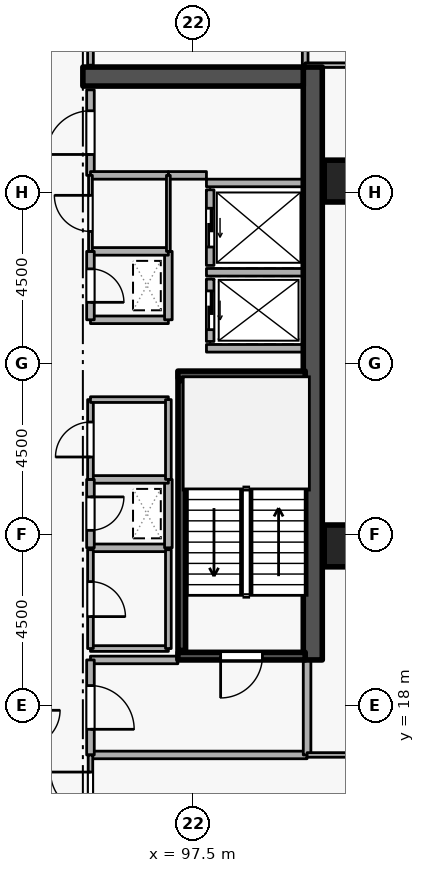
"""IFC4 building model, lengths in metres.
Left out: names, types, materials, properties, quantities, classifications, styles, units other than length and angle.
Written with IfcOpenShell. Run it as: python <this file> out.ifc"""

import sys

from ifc_helpers import new_model, si_unit, direction, frame, frame_2d, origin, origin_2d, place, context, subcontext, project, spatial, rectangle, extrude, element, fill, save


model = new_model("IFC4")
c1 = context("Model", 3, precision=1e-05, world=origin(), true_north=direction((0.0, 1.0)))
c2 = subcontext(c1, "Body", "Model", "MODEL_VIEW")
j1 = project(units=[si_unit("LENGTHUNIT", "METRE"), si_unit("PLANEANGLEUNIT", "RADIAN")], contexts=[c1])
p1 = place(None, origin())
s1 = spatial("IfcSite", under=j1, at=p1, CompositionType="ELEMENT")
p2 = place(p1, origin())
s2 = spatial("IfcBuilding", under=s1, at=p2, CompositionType="ELEMENT")
p3 = place(p2, frame((0.0, 0.0, 192.9)))
s3 = spatial("IfcBuildingStorey", under=s2, at=p3, CompositionType="ELEMENT", Elevation=192.9)
p4 = place(p3, frame((100.65, 19.2, 0.0), z_axis=(0.0, 0.0, 1.0), x_axis=(0.0, 1.0, 0.0)))
e1 = element("IfcWall", 1, at=p4, inside=s3, PredefinedType="SHEAR", context=c2, shape_type="SweptSolid", body=[
    extrude(rectangle(XDim=15.6, YDim=0.5, at=frame_2d((7.8, 0.0))), origin(), (0.0, 0.0, 1.0), 3.6),
])
p5 = place(p3, frame((94.6, 34.55, 0.0), z_axis=(0.0, 0.0, 1.0), x_axis=(1.0, 0.0, 0.0)))
e2 = element("IfcWall", 2, at=p5, inside=s3, PredefinedType="SHEAR", context=c2, shape_type="SweptSolid", body=[
    extrude(rectangle(XDim=5.8, YDim=0.5, at=frame_2d((2.9, 0.0))), origin(), (0.0, 0.0, 1.0), 3.6),
])
for number, where, z_axis, x_axis in (
    (3, (101.5, 22.2, 0.0), (0.0, 0.0, 1.0), (1.0, 0.0, 0.0)),
    (4, (101.5, 31.8, 0.0), (0.0, 0.0, 1.0), (1.0, 0.0, 0.0)),
):
    element("IfcColumn", number, at=place(p3, frame(where, z_axis=z_axis, x_axis=x_axis)), inside=s3, PredefinedType="COLUMN", context=c2, shape_type="SweptSolid", body=[
        extrude(rectangle(XDim=1.1, YDim=1.1, at=origin_2d()), origin(), (0.0, 0.0, 1.0), 3.6),
    ])
p6 = place(p3, frame((97.95, 29.22, 0.0), z_axis=(0.0, 0.0, 1.0), x_axis=(0.0, -1.0, 0.0)))
e5 = element("IfcWall", 5, at=p6, inside=s3, PredefinedType="STANDARD", context=c2, shape_type="SweptSolid", body=[
    extrude(rectangle(XDim=1.64, YDim=0.2, at=frame_2d((0.82, 0.0))), origin(), (0.0, 0.0, 1.0), 3.34),
])
p7 = place(p6, frame((0.31, 0.0, 0.0)))
e6 = element("IfcOpeningElement", 6, at=p7, cuts=e5, PredefinedType="OPENING", context=c2, shape_type="SweptSolid", body=[
    extrude(rectangle(XDim=1.02, YDim=2.06, at=frame_2d((0.51, 1.03))), frame((0.0, 0.11, 0.0), z_axis=(0.0, -1.0, 0.0), x_axis=(1.0, 0.0, 0.0)), (0.0, 0.0, 1.0), 0.22),
])
p8 = place(p3, frame((97.95, 31.57, 0.0), z_axis=(0.0, 0.0, 1.0), x_axis=(0.0, -1.0, 0.0)))
e7 = element("IfcWall", 7, at=p8, inside=s3, PredefinedType="STANDARD", context=c2, shape_type="SweptSolid", body=[
    extrude(rectangle(XDim=1.99, YDim=0.2, at=frame_2d((0.995, 0.0))), origin(), (0.0, 0.0, 1.0), 3.34),
])
p9 = place(p8, frame((0.485, 0.0, 0.0)))
e8 = element("IfcOpeningElement", 8, at=p9, cuts=e7, PredefinedType="OPENING", context=c2, shape_type="SweptSolid", body=[
    extrude(rectangle(XDim=1.02, YDim=2.06, at=frame_2d((0.51, 1.03))), frame((0.0, 0.11, 0.0), z_axis=(0.0, -1.0, 0.0), x_axis=(1.0, 0.0, 0.0)), (0.0, 0.0, 1.0), 0.22),
])
for number, where, z_axis, x_axis in (
    (9, (97.852, 29.4, 0.0), (0.0, 0.0, 1.0), (1.0, 0.0, 0.0)),
    (10, (97.852, 27.4, 0.0), (0.0, 0.0, 1.0), (1.0, 0.0, 0.0)),
    (11, (97.852, 31.75, 0.0), (0.0, 0.0, 1.0), (1.0, 0.0, 0.0)),
):
    element("IfcWall", number, at=place(p3, frame(where, z_axis=z_axis, x_axis=x_axis)), inside=s3, PredefinedType="STANDARD", context=c2, shape_type="SweptSolid", body=[
        extrude(rectangle(XDim=2.536, YDim=0.2, at=frame_2d((1.268, 0.0))), origin(), (0.0, 0.0, 1.0), 3.34),
    ])
p10 = place(p3, frame((100.45, 19.3, 0.0), z_axis=(0.0, 0.0, 1.0), x_axis=(-1.0, 0.0, 0.0)))
e12 = element("IfcWall", 12, at=p10, inside=s3, PredefinedType="SHEAR", context=c2, shape_type="SweptSolid", body=[
    extrude(rectangle(XDim=3.35, YDim=0.2, at=frame_2d((1.675, 0.0))), origin(), (0.0, 0.0, 1.0), 3.6),
])
p11 = place(p10, frame((1.125, 0.0, 0.0)))
e13 = element("IfcOpeningElement", 13, at=p11, cuts=e12, PredefinedType="OPENING", context=c2, shape_type="SweptSolid", body=[
    extrude(rectangle(XDim=1.1, YDim=2.1, at=frame_2d((0.55, 1.05))), frame((0.0, 0.11, 0.0), z_axis=(0.0, -1.0, 0.0), x_axis=(1.0, 0.0, 0.0)), (0.0, 0.0, 1.0), 0.22),
])
p12 = place(p3, frame((97.1, 26.7, 0.0), z_axis=(0.0, 0.0, 1.0), x_axis=(1.0, 0.0, 0.0)))
e14 = element("IfcWall", 14, at=p12, inside=s3, PredefinedType="SHEAR", context=c2, shape_type="SweptSolid", body=[
    extrude(rectangle(XDim=3.35, YDim=0.2, at=frame_2d((1.675, 0.0))), origin(), (0.0, 0.0, 1.0), 3.6),
])
p13 = place(p3, frame((97.203, 26.55, 0.0), z_axis=(0.0, 0.0, 1.0), x_axis=(0.0, -1.0, 0.0)))
e15 = element("IfcWall", 15, at=p13, inside=s3, PredefinedType="SHEAR", context=c2, shape_type="SweptSolid", body=[
    extrude(rectangle(XDim=7.1, YDim=0.2, at=frame_2d((3.55, 0.0))), origin(), (0.0, 0.0, 1.0), 3.6),
])
p14 = place(p3, frame((94.8, 16.7, 0.0), z_axis=(0.0, 0.0, 1.0), x_axis=(1.0, 0.0, 0.0)))
e16 = element("IfcWall", 16, at=p14, inside=s3, PredefinedType="STANDARD", context=c2, shape_type="SweptSolid", body=[
    extrude(rectangle(XDim=5.7, YDim=0.2, at=frame_2d((2.85, 0.0))), origin(), (0.0, 0.0, 1.0), 3.34),
])
p15 = place(p3, frame((100.5, 16.7, 0.0), z_axis=(0.0, 0.0, 1.0), x_axis=(0.0, 1.0, 0.0)))
e17 = element("IfcWall", 17, at=p15, inside=s3, PredefinedType="STANDARD", context=c2, shape_type="SweptSolid", body=[
    extrude(rectangle(XDim=2.5, YDim=0.2, at=frame_2d((1.25, 0.0))), origin(), (0.0, 0.0, 1.0), 3.34),
])
p16 = place(p3, frame((97.1, 19.2, 0.0), z_axis=(0.0, 0.0, 1.0), x_axis=(-1.0, 0.0, 0.0)))
e18 = element("IfcWall", 18, at=p16, inside=s3, PredefinedType="STANDARD", context=c2, shape_type="SweptSolid", body=[
    extrude(rectangle(XDim=2.3, YDim=0.2, at=frame_2d((1.15, 0.0))), origin(), (0.0, 0.0, 1.0), 2.545),
])
p17 = place(p3, frame((94.8, 19.2, 0.0), z_axis=(0.0, 0.0, 1.0), x_axis=(0.0, -1.0, 0.0)))
e19 = element("IfcWall", 19, at=p17, inside=s3, PredefinedType="STANDARD", context=c2, shape_type="SweptSolid", body=[
    extrude(rectangle(XDim=2.5, YDim=0.2, at=frame_2d((1.25, 0.0))), origin(), (0.0, 0.0, 1.0), 3.34),
])
p18 = place(p17, frame((0.675, 0.0, 0.0)))
e20 = element("IfcOpeningElement", 20, at=p18, cuts=e19, PredefinedType="OPENING", context=c2, shape_type="SweptSolid", body=[
    extrude(rectangle(XDim=1.15, YDim=2.1, at=frame_2d((0.575, 1.05))), frame((0.0, 0.11, 0.0), z_axis=(0.0, -1.0, 0.0), x_axis=(1.0, 0.0, 0.0)), (0.0, 0.0, 1.0), 0.22),
])
p19 = place(p3, frame((94.8, 28.15, 0.0), z_axis=(0.0, 0.0, 1.0), x_axis=(1.0, 0.0, 0.0)))
e21 = element("IfcWall", 21, at=p19, inside=s3, PredefinedType="STANDARD", context=c2, shape_type="SweptSolid", body=[
    extrude(rectangle(XDim=2.05, YDim=0.2, at=frame_2d((1.025, 0.0))), origin(), (0.0, 0.0, 1.0), 3.34),
])
p20 = place(p3, frame((96.85, 28.15, 0.0), z_axis=(0.0, 0.0, 1.0), x_axis=(0.0, 1.0, 0.0)))
e22 = element("IfcWall", 22, at=p20, inside=s3, PredefinedType="STANDARD", context=c2, shape_type="SweptSolid", body=[
    extrude(rectangle(XDim=1.8, YDim=0.2, at=frame_2d((0.9, 0.0))), origin(), (0.0, 0.0, 1.0), 3.34),
])
p21 = place(p3, frame((96.85, 29.95, 0.0), z_axis=(0.0, 0.0, 1.0), x_axis=(-1.0, 0.0, 0.0)))
e23 = element("IfcWall", 23, at=p21, inside=s3, PredefinedType="STANDARD", context=c2, shape_type="SweptSolid", body=[
    extrude(rectangle(XDim=2.05, YDim=0.2, at=frame_2d((1.025, 0.0))), origin(), (0.0, 0.0, 1.0), 3.34),
])
p22 = place(p3, frame((94.8, 29.95, 0.0), z_axis=(0.0, 0.0, 1.0), x_axis=(0.0, -1.0, 0.0)))
e24 = element("IfcWall", 24, at=p22, inside=s3, PredefinedType="STANDARD", context=c2, shape_type="SweptSolid", body=[
    extrude(rectangle(XDim=1.8, YDim=0.2, at=frame_2d((0.9, 0.0))), origin(), (0.0, 0.0, 1.0), 3.34),
])
p23 = place(p22, frame((0.46, 0.0, 0.0)))
e25 = element("IfcOpeningElement", 25, at=p23, cuts=e24, PredefinedType="OPENING", context=c2, shape_type="SweptSolid", body=[
    extrude(rectangle(XDim=0.88, YDim=2.04, at=frame_2d((0.44, 1.02))), frame((0.0, 0.11, 0.0), z_axis=(0.0, -1.0, 0.0), x_axis=(1.0, 0.0, 0.0)), (0.0, 0.0, 1.0), 0.22),
])
p24 = place(p3, frame((94.8, 22.15, 0.0), z_axis=(0.0, 0.0, 1.0), x_axis=(1.0, 0.0, 0.0)))
e26 = element("IfcWall", 26, at=p24, inside=s3, PredefinedType="STANDARD", context=c2, shape_type="SweptSolid", body=[
    extrude(rectangle(XDim=2.05, YDim=0.2, at=frame_2d((1.025, 0.0))), origin(), (0.0, 0.0, 1.0), 3.34),
])
p25 = place(p3, frame((96.85, 22.15, 0.0), z_axis=(0.0, 0.0, 1.0), x_axis=(0.0, 1.0, 0.0)))
e27 = element("IfcWall", 27, at=p25, inside=s3, PredefinedType="STANDARD", context=c2, shape_type="SweptSolid", body=[
    extrude(rectangle(XDim=1.8, YDim=0.2, at=frame_2d((0.9, 0.0))), origin(), (0.0, 0.0, 1.0), 3.34),
])
p26 = place(p3, frame((96.85, 23.95, 0.0), z_axis=(0.0, 0.0, 1.0), x_axis=(-1.0, 0.0, 0.0)))
e28 = element("IfcWall", 28, at=p26, inside=s3, PredefinedType="STANDARD", context=c2, shape_type="SweptSolid", body=[
    extrude(rectangle(XDim=2.05, YDim=0.2, at=frame_2d((1.025, 0.0))), origin(), (0.0, 0.0, 1.0), 3.34),
])
p27 = place(p3, frame((94.8, 23.95, 0.0), z_axis=(0.0, 0.0, 1.0), x_axis=(0.0, -1.0, 0.0)))
e29 = element("IfcWall", 29, at=p27, inside=s3, PredefinedType="STANDARD", context=c2, shape_type="SweptSolid", body=[
    extrude(rectangle(XDim=1.8, YDim=0.2, at=frame_2d((0.9, 0.0))), origin(), (0.0, 0.0, 1.0), 3.34),
])
p28 = place(p27, frame((0.46, 0.0, 0.0)))
e30 = element("IfcOpeningElement", 30, at=p28, cuts=e29, PredefinedType="OPENING", context=c2, shape_type="SweptSolid", body=[
    extrude(rectangle(XDim=0.88, YDim=2.04, at=frame_2d((0.44, 1.02))), frame((0.0, 0.11, 0.0), z_axis=(0.0, -1.0, 0.0), x_axis=(1.0, 0.0, 0.0)), (0.0, 0.0, 1.0), 0.22),
])
p29 = place(p3, frame((94.8, 31.95, 0.0), z_axis=(0.0, 0.0, 1.0), x_axis=(0.0, 1.0, 0.0)))
e31 = element("IfcWall", 31, at=p29, inside=s3, PredefinedType="STANDARD", context=c2, shape_type="SweptSolid", body=[
    extrude(rectangle(XDim=2.25, YDim=0.2, at=frame_2d((1.125, 0.0))), origin(), (0.0, 0.0, 1.0), 3.34),
])
p30 = place(p29, frame((0.55, 0.0, 0.0)))
e32 = element("IfcOpeningElement", 32, at=p30, cuts=e31, PredefinedType="OPENING", context=c2, shape_type="SweptSolid", body=[
    extrude(rectangle(XDim=1.15, YDim=2.1, at=frame_2d((0.575, 1.05))), frame((0.0, 0.11, 0.0), z_axis=(0.0, -1.0, 0.0), x_axis=(1.0, 0.0, 0.0)), (0.0, 0.0, 1.0), 0.22),
])
p31 = place(p3, frame((97.852, 31.95, 0.0), z_axis=(0.0, 0.0, 1.0), x_axis=(-1.0, 0.0, 0.0)))
e33 = element("IfcWall", 33, at=p31, inside=s3, PredefinedType="STANDARD", context=c2, shape_type="SweptSolid", body=[
    extrude(rectangle(XDim=1.002, YDim=0.2, at=frame_2d((0.501, 0.0))), origin(), (0.0, 0.0, 1.0), 3.34),
])
p32 = place(p3, frame((96.85, 31.95, 0.0), z_axis=(0.0, 0.0, 1.0), x_axis=(-1.0, 0.0, 0.0)))
e34 = element("IfcWall", 34, at=p32, inside=s3, PredefinedType="STANDARD", context=c2, shape_type="SweptSolid", body=[
    extrude(rectangle(XDim=2.05, YDim=0.2, at=frame_2d((1.025, 0.0))), origin(), (0.0, 0.0, 1.0), 3.34),
])
p33 = place(p3, frame((94.8, 19.5, 0.0), z_axis=(0.0, 0.0, 1.0), x_axis=(1.0, 0.0, 0.0)))
e35 = element("IfcWall", 35, at=p33, inside=s3, PredefinedType="PARTITIONING", context=c2, shape_type="SweptSolid", body=[
    extrude(rectangle(XDim=2.05, YDim=0.15, at=frame_2d((1.025, 0.0))), origin(), (0.0, 0.0, 1.0), 2.545),
])
p34 = place(p3, frame((96.85, 19.5, 0.0), z_axis=(0.0, 0.0, 1.0), x_axis=(0.0, 1.0, 0.0)))
e36 = element("IfcWall", 36, at=p34, inside=s3, PredefinedType="PARTITIONING", context=c2, shape_type="SweptSolid", body=[
    extrude(rectangle(XDim=2.6, YDim=0.15, at=frame_2d((1.3, 0.0))), origin(), (0.0, 0.0, 1.0), 3.34),
])
p35 = place(p3, frame((94.8, 22.1, 0.0), z_axis=(0.0, 0.0, 1.0), x_axis=(0.0, -1.0, 0.0)))
e37 = element("IfcWall", 37, at=p35, inside=s3, PredefinedType="PARTITIONING", context=c2, shape_type="SweptSolid", body=[
    extrude(rectangle(XDim=2.6, YDim=0.15, at=frame_2d((1.3, 0.0))), origin(), (0.0, 0.0, 1.0), 3.34),
])
p36 = place(p35, frame((0.84, 0.0, 0.0)))
e38 = element("IfcOpeningElement", 38, at=p36, cuts=e37, PredefinedType="OPENING", context=c2, shape_type="SweptSolid", body=[
    extrude(rectangle(XDim=0.92, YDim=2.08, at=frame_2d((0.46, 1.04))), frame((0.0, 0.085, 0.0), z_axis=(0.0, -1.0, 0.0), x_axis=(1.0, 0.0, 0.0)), (0.0, 0.0, 1.0), 0.17),
])
p37 = place(p3, frame((94.8, 23.95, 0.0), z_axis=(0.0, 0.0, 1.0), x_axis=(0.0, 1.0, 0.0)))
e39 = element("IfcWall", 39, at=p37, inside=s3, PredefinedType="PARTITIONING", context=c2, shape_type="SweptSolid", body=[
    extrude(rectangle(XDim=2.1, YDim=0.15, at=frame_2d((1.05, 0.0))), origin(), (0.0, 0.0, 1.0), 3.34),
])
p38 = place(p37, frame((0.59, 0.0, 0.0)))
e40 = element("IfcOpeningElement", 40, at=p38, cuts=e39, PredefinedType="OPENING", context=c2, shape_type="SweptSolid", body=[
    extrude(rectangle(XDim=0.92, YDim=2.08, at=frame_2d((0.46, 1.04))), frame((0.0, 0.085, 0.0), z_axis=(0.0, -1.0, 0.0), x_axis=(1.0, 0.0, 0.0)), (0.0, 0.0, 1.0), 0.17),
])
p39 = place(p3, frame((94.8, 26.05, 0.0), z_axis=(0.0, 0.0, 1.0), x_axis=(1.0, 0.0, 0.0)))
e41 = element("IfcWall", 41, at=p39, inside=s3, PredefinedType="PARTITIONING", context=c2, shape_type="SweptSolid", body=[
    extrude(rectangle(XDim=2.05, YDim=0.15, at=frame_2d((1.025, 0.0))), origin(), (0.0, 0.0, 1.0), 3.34),
])
p40 = place(p3, frame((96.85, 26.05, 0.0), z_axis=(0.0, 0.0, 1.0), x_axis=(0.0, -1.0, 0.0)))
e42 = element("IfcWall", 42, at=p40, inside=s3, PredefinedType="PARTITIONING", context=c2, shape_type="SweptSolid", body=[
    extrude(rectangle(XDim=2.1, YDim=0.15, at=frame_2d((1.05, 0.0))), origin(), (0.0, 0.0, 1.0), 3.34),
])
p41 = place(p3, frame((94.8, 29.95, 0.0), z_axis=(0.0, 0.0, 1.0), x_axis=(0.0, 1.0, 0.0)))
e43 = element("IfcWall", 43, at=p41, inside=s3, PredefinedType="PARTITIONING", context=c2, shape_type="SweptSolid", body=[
    extrude(rectangle(XDim=2.0, YDim=0.1, at=frame_2d((1.0, 0.0))), origin(), (0.0, 0.0, 1.0), 3.34),
])
p42 = place(p41, frame((0.525, 0.0, 0.0)))
e44 = element("IfcOpeningElement", 44, at=p42, cuts=e43, PredefinedType="OPENING", context=c2, shape_type="SweptSolid", body=[
    extrude(rectangle(XDim=0.95, YDim=2.1, at=frame_2d((0.475, 1.05))), frame((0.0, 0.06, 0.0), z_axis=(0.0, -1.0, 0.0), x_axis=(1.0, 0.0, 0.0)), (0.0, 0.0, 1.0), 0.12),
])
p43 = place(p3, frame((96.85, 31.95, 0.0), z_axis=(0.0, 0.0, 1.0), x_axis=(0.0, -1.0, 0.0)))
e45 = element("IfcWall", 45, at=p43, inside=s3, PredefinedType="PARTITIONING", context=c2, shape_type="SweptSolid", body=[
    extrude(rectangle(XDim=2.0, YDim=0.1, at=frame_2d((1.0, 0.0))), origin(), (0.0, 0.0, 1.0), 3.34),
])
p44 = place(p3, frame((100.45, 37.25, 0.0), z_axis=(0.0, 0.0, 1.0), x_axis=(0.0, -1.0, 0.0)))
e46 = element("IfcWall", 46, at=p44, inside=s3, PredefinedType="PARTITIONING", context=c2, shape_type="SweptSolid", body=[
    extrude(rectangle(XDim=2.4, YDim=0.15, at=frame_2d((1.2, 0.0))), origin(), (0.0, 0.0, 1.0), 3.34),
])
p45 = place(p3, frame((94.8, 34.85, 0.0), z_axis=(0.0, 0.0, 1.0), x_axis=(0.0, 1.0, 0.0)))
e47 = element("IfcWall", 47, at=p45, inside=s3, PredefinedType="PARTITIONING", context=c2, shape_type="SweptSolid", body=[
    extrude(rectangle(XDim=2.4, YDim=0.15, at=frame_2d((1.2, 0.0))), origin(), (0.0, 0.0, 1.0), 3.34),
])
p46 = place(p45, frame((0.725, 0.0, 0.0)))
e48 = element("IfcOpeningElement", 48, at=p46, cuts=e47, PredefinedType="OPENING", context=c2, shape_type="SweptSolid", body=[
    extrude(rectangle(XDim=0.95, YDim=2.1, at=frame_2d((0.475, 1.05))), frame((0.0, 0.085, 0.0), z_axis=(0.0, -1.0, 0.0), x_axis=(1.0, 0.0, 0.0)), (0.0, 0.0, 1.0), 0.17),
])
p47 = place(p3, frame((94.8, 14.75, 0.0), z_axis=(0.0, 0.0, 1.0), x_axis=(0.0, 1.0, 0.0)))
e49 = element("IfcWall", 49, at=p47, inside=s3, PredefinedType="PARTITIONING", context=c2, shape_type="SweptSolid", body=[
    extrude(rectangle(XDim=1.95, YDim=0.12, at=frame_2d((0.975, 0.0))), origin(), (0.0, 0.0, 1.0), 3.34),
])
p48 = place(p47, frame((0.45, 0.0, 0.0)))
e50 = element("IfcOpeningElement", 50, at=p48, cuts=e49, PredefinedType="OPENING", context=c2, shape_type="SweptSolid", body=[
    extrude(rectangle(XDim=1.05, YDim=2.1, at=frame_2d((0.525, 1.05))), frame((0.0, 0.07, 0.0), z_axis=(0.0, -1.0, 0.0), x_axis=(1.0, 0.0, 0.0)), (0.0, 0.0, 1.0), 0.14),
])
p49 = place(p3, frame((100.5, 16.7, 0.0), z_axis=(0.0, 0.0, 1.0), x_axis=(1.0, 0.0, 0.0)))
e51 = element("IfcWall", 51, at=p49, inside=s3, PredefinedType="PARTITIONING", context=c2, shape_type="SweptSolid", body=[
    extrude(rectangle(XDim=5.72, YDim=0.12, at=frame_2d((2.86, 0.0))), origin(), (0.0, 0.0, 1.0), 3.34),
])
p50 = place(p3, frame((106.22, 34.85, 0.0), z_axis=(0.0, 0.0, 1.0), x_axis=(-1.0, 0.0, 0.0)))
e52 = element("IfcWall", 52, at=p50, inside=s3, PredefinedType="PARTITIONING", context=c2, shape_type="SweptSolid", body=[
    extrude(rectangle(XDim=5.77, YDim=0.12, at=frame_2d((2.885, 0.0))), origin(), (0.0, 0.0, 1.0), 2.545),
])
p51 = place(p7, origin())
e53 = element("IfcDoor", 53, at=p51, inside=s3, OperationType="SLIDING_TO_LEFT", PredefinedType="DOOR", context=c2, shape_type="SweptSolid", body=[
    extrude(rectangle(XDim=1.02, YDim=2.06, at=frame_2d((0.51, 1.03))), frame((0.0, 0.025, 0.0), z_axis=(0.0, -1.0, 0.0), x_axis=(1.0, 0.0, 0.0)), (0.0, 0.0, 1.0), 0.05),
])
fill(e6, e53)
p52 = place(p9, origin())
e54 = element("IfcDoor", 54, at=p52, inside=s3, OperationType="SLIDING_TO_LEFT", PredefinedType="DOOR", context=c2, shape_type="SweptSolid", body=[
    extrude(rectangle(XDim=1.02, YDim=2.06, at=frame_2d((0.51, 1.03))), frame((0.0, 0.025, 0.0), z_axis=(0.0, -1.0, 0.0), x_axis=(1.0, 0.0, 0.0)), (0.0, 0.0, 1.0), 0.05),
])
fill(e8, e54)
p53 = place(p11, origin())
e55 = element("IfcDoor", 55, at=p53, inside=s3, OperationType="SINGLE_SWING_RIGHT", PredefinedType="DOOR", context=c2, shape_type="SweptSolid", body=[
    extrude(rectangle(XDim=1.1, YDim=2.1, at=frame_2d((0.55, 1.05))), frame((0.0, 0.025, 0.0), z_axis=(0.0, -1.0, 0.0), x_axis=(1.0, 0.0, 0.0)), (0.0, 0.0, 1.0), 0.05),
])
fill(e13, e55)
p54 = place(p18, origin())
e56 = element("IfcDoor", 56, at=p54, inside=s3, OperationType="SINGLE_SWING_RIGHT", PredefinedType="DOOR", context=c2, shape_type="SweptSolid", body=[
    extrude(rectangle(XDim=1.15, YDim=2.1, at=frame_2d((0.575, 1.05))), frame((0.0, 0.025, 0.0), z_axis=(0.0, -1.0, 0.0), x_axis=(1.0, 0.0, 0.0)), (0.0, 0.0, 1.0), 0.05),
])
fill(e20, e56)
p55 = place(p23, origin())
e57 = element("IfcDoor", 57, at=p55, inside=s3, OperationType="SINGLE_SWING_RIGHT", PredefinedType="DOOR", context=c2, shape_type="SweptSolid", body=[
    extrude(rectangle(XDim=0.88, YDim=2.04, at=frame_2d((0.44, 1.02))), frame((0.0, 0.025, 0.0), z_axis=(0.0, -1.0, 0.0), x_axis=(1.0, 0.0, 0.0)), (0.0, 0.0, 1.0), 0.05),
])
fill(e25, e57)
p56 = place(p28, origin())
e58 = element("IfcDoor", 58, at=p56, inside=s3, OperationType="SINGLE_SWING_LEFT", PredefinedType="DOOR", context=c2, shape_type="SweptSolid", body=[
    extrude(rectangle(XDim=0.88, YDim=2.04, at=frame_2d((0.44, 1.02))), frame((0.0, 0.025, 0.0), z_axis=(0.0, -1.0, 0.0), x_axis=(1.0, 0.0, 0.0)), (0.0, 0.0, 1.0), 0.05),
])
fill(e30, e58)
p57 = place(p36, origin())
e59 = element("IfcDoor", 59, at=p57, inside=s3, OperationType="SINGLE_SWING_RIGHT", PredefinedType="DOOR", context=c2, shape_type="SweptSolid", body=[
    extrude(rectangle(XDim=0.92, YDim=2.08, at=frame_2d((0.46, 1.04))), frame((0.0, 0.025, 0.0), z_axis=(0.0, -1.0, 0.0), x_axis=(1.0, 0.0, 0.0)), (0.0, 0.0, 1.0), 0.05),
])
fill(e38, e59)
p58 = place(p38, origin())
e60 = element("IfcDoor", 60, at=p58, inside=s3, OperationType="SINGLE_SWING_LEFT", PredefinedType="DOOR", context=c2, shape_type="SweptSolid", body=[
    extrude(rectangle(XDim=0.92, YDim=2.08, at=frame_2d((0.46, 1.04))), frame((0.0, 0.025, 0.0), z_axis=(0.0, -1.0, 0.0), x_axis=(1.0, 0.0, 0.0)), (0.0, 0.0, 1.0), 0.05),
])
fill(e40, e60)
p59 = place(p42, origin())
e61 = element("IfcDoor", 61, at=p59, inside=s3, OperationType="SINGLE_SWING_RIGHT", PredefinedType="DOOR", context=c2, shape_type="SweptSolid", body=[
    extrude(rectangle(XDim=0.95, YDim=2.1, at=frame_2d((0.475, 1.05))), frame((0.0, 0.025, 0.0), z_axis=(0.0, -1.0, 0.0), x_axis=(1.0, 0.0, 0.0)), (0.0, 0.0, 1.0), 0.05),
])
fill(e44, e61)
p60 = place(p30, origin())
e62 = element("IfcDoor", 62, at=p60, inside=s3, OperationType="SINGLE_SWING_LEFT", PredefinedType="DOOR", context=c2, shape_type="SweptSolid", body=[
    extrude(rectangle(XDim=1.15, YDim=2.1, at=frame_2d((0.575, 1.05))), frame((0.0, 0.025, 0.0), z_axis=(0.0, -1.0, 0.0), x_axis=(1.0, 0.0, 0.0)), (0.0, 0.0, 1.0), 0.05),
])
fill(e32, e62)
p61 = place(p48, origin())
e63 = element("IfcDoor", 63, at=p61, inside=s3, OperationType="SINGLE_SWING_RIGHT", PredefinedType="DOOR", context=c2, shape_type="SweptSolid", body=[
    extrude(rectangle(XDim=1.05, YDim=2.1, at=frame_2d((0.525, 1.05))), frame((0.0, 0.025, 0.0), z_axis=(0.0, -1.0, 0.0), x_axis=(1.0, 0.0, 0.0)), (0.0, 0.0, 1.0), 0.05),
])
fill(e50, e63)
save(model, sys.argv[1])
